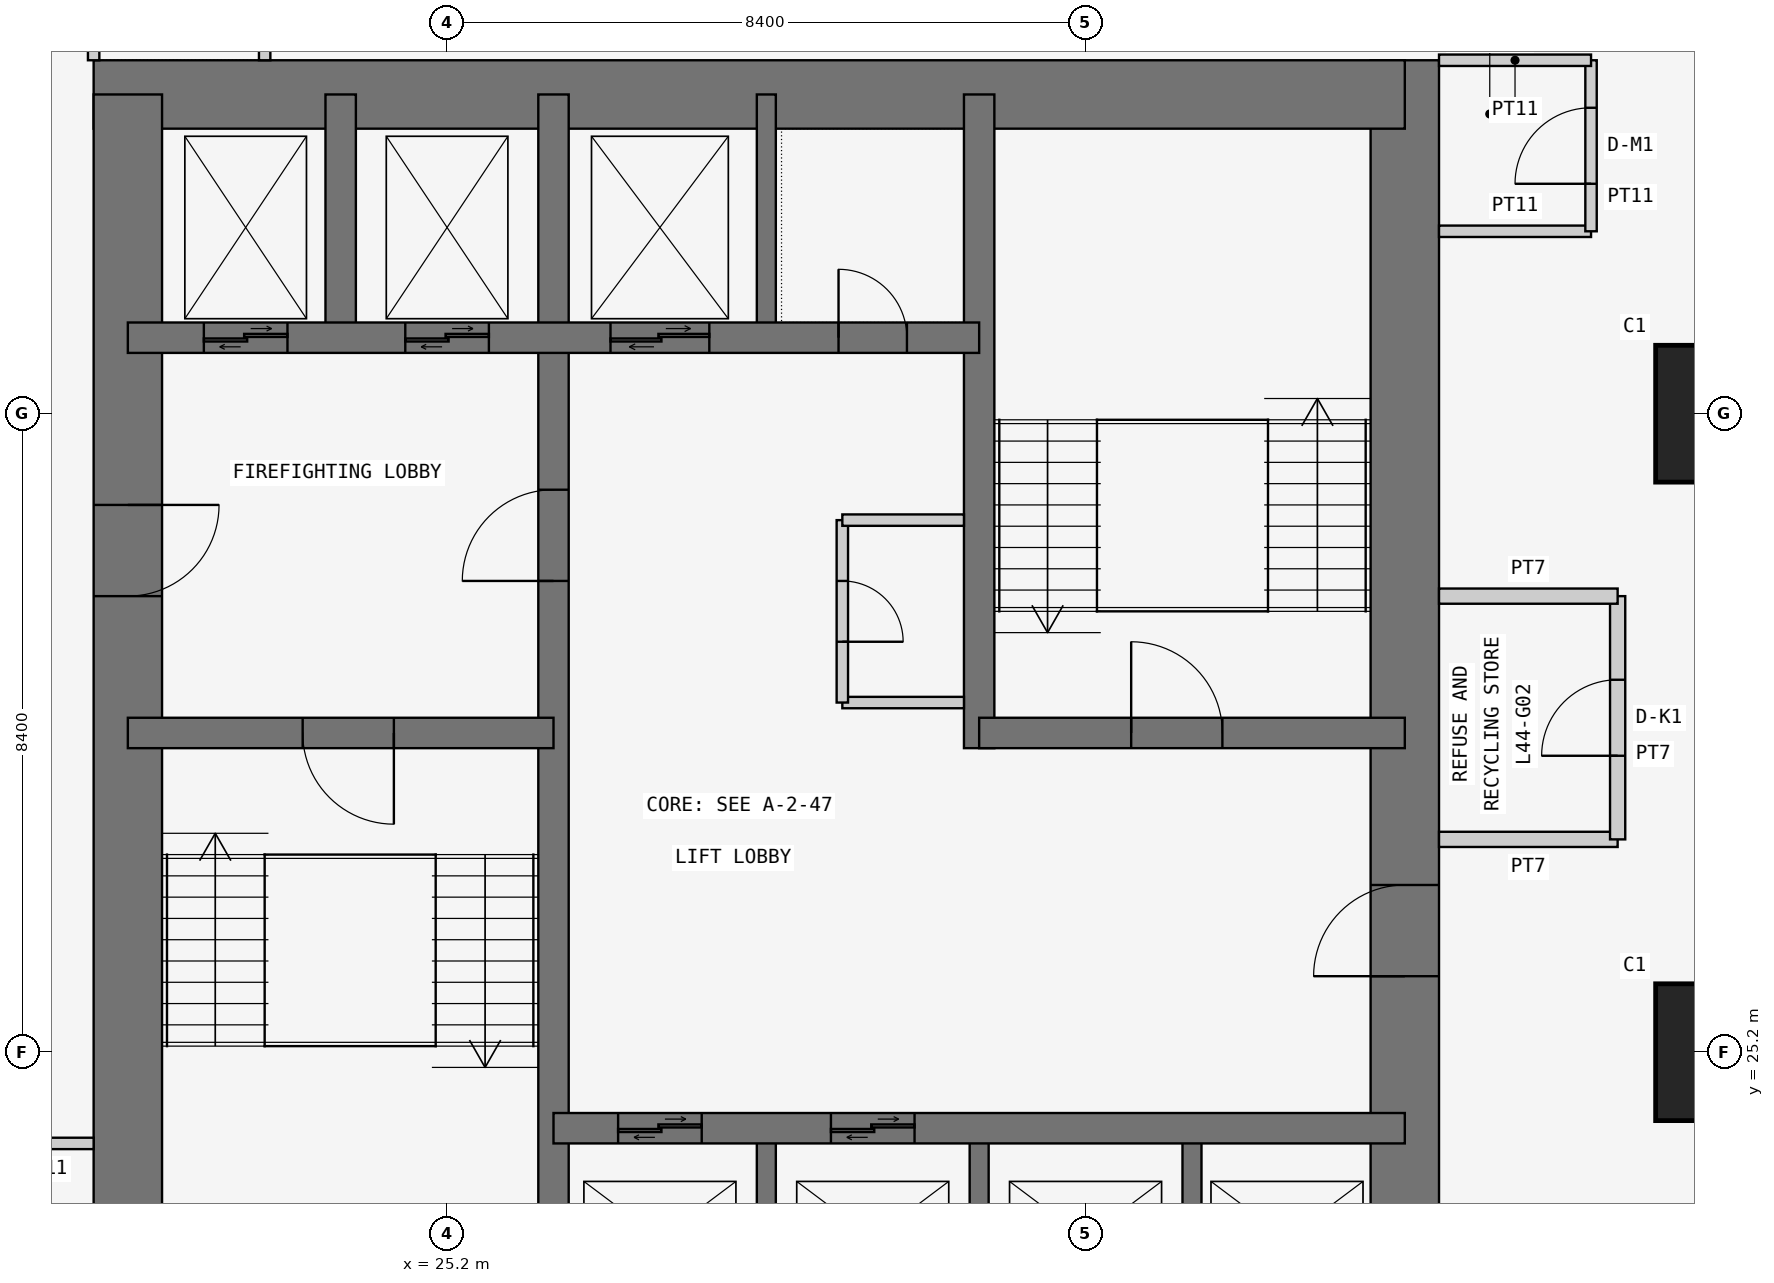
"""IFC4 building model, lengths in metres.
Left out: names, types, materials, properties, quantities, classifications, styles, units other than length and angle.
Written with IfcOpenShell. Run it as: python <this file> out.ifc"""

import sys

from ifc_helpers import new_model, si_unit, direction, frame, frame_2d, origin, origin_2d, place, context, subcontext, project, spatial, rectangle, extrude, element, fill, save


model = new_model("IFC4")
c1 = context("Model", 3, precision=1e-05, world=origin(), true_north=direction((0.0, 1.0)))
c2 = subcontext(c1, "Body", "Model", "MODEL_VIEW")
j1 = project(units=[si_unit("LENGTHUNIT", "METRE"), si_unit("PLANEANGLEUNIT", "RADIAN")], contexts=[c1])
p1 = place(None, origin())
s1 = spatial("IfcSite", under=j1, at=p1, CompositionType="ELEMENT")
p2 = place(p1, origin())
s2 = spatial("IfcBuilding", under=s1, at=p2, CompositionType="ELEMENT")
p3 = place(p2, frame((0.0, 0.0, 170.1)))
s3 = spatial("IfcBuildingStorey", under=s2, at=p3, CompositionType="ELEMENT", Elevation=170.1)
for number, where, z_axis, x_axis in (
    (1, (42.0, 25.2, 0.0), (0.0, 0.0, 1.0), (1.0, 0.0, 0.0)),
    (2, (42.0, 33.6, 0.0), (0.0, 0.0, 1.0), (1.0, 0.0, 0.0)),
):
    element("IfcColumn", number, at=place(p3, frame(where, z_axis=z_axis, x_axis=x_axis)), inside=s3, PredefinedType="COLUMN", context=c2, shape_type="SweptSolid", body=[
        extrude(rectangle(XDim=1.8, YDim=1.8, at=origin_2d()), origin(), (0.0, 0.0, 1.0), 3.6),
    ])
p4 = place(p3, frame((37.8, 21.0, 0.0), z_axis=(0.0, 0.0, 1.0), x_axis=(0.0, 1.0, 0.0)))
e3 = element("IfcWall", 3, at=p4, inside=s3, PredefinedType="SHEAR", context=c2, shape_type="SweptSolid", body=[
    extrude(rectangle(XDim=17.25, YDim=0.9, at=frame_2d((8.625, 0.0))), origin(), (0.0, 0.0, 1.0), 3.6),
])
p5 = place(p4, frame((5.2, 0.0, 0.0)))
e4 = element("IfcOpeningElement", 4, at=p5, cuts=e3, PredefinedType="OPENING", context=c2, shape_type="SweptSolid", body=[
    extrude(rectangle(XDim=1.2, YDim=2.1, at=frame_2d((0.6, 1.05))), frame((0.0, 0.46, 0.0), z_axis=(0.0, -1.0, 0.0), x_axis=(1.0, 0.0, 0.0)), (0.0, 0.0, 1.0), 0.92),
])
p6 = place(p3, frame((37.8, 37.8, 0.0), z_axis=(0.0, 0.0, 1.0), x_axis=(-1.0, 0.0, 0.0)))
e5 = element("IfcWall", 5, at=p6, inside=s3, PredefinedType="SHEAR", context=c2, shape_type="SweptSolid", body=[
    extrude(rectangle(XDim=17.25, YDim=0.9, at=frame_2d((8.625, 0.0))), origin(), (0.0, 0.0, 1.0), 3.6),
])
p7 = place(p3, frame((21.0, 37.8, 0.0), z_axis=(0.0, 0.0, 1.0), x_axis=(0.0, -1.0, 0.0)))
e6 = element("IfcWall", 6, at=p7, inside=s3, PredefinedType="SHEAR", context=c2, shape_type="SweptSolid", body=[
    extrude(rectangle(XDim=17.25, YDim=0.9, at=frame_2d((8.625, 0.0))), origin(), (0.0, 0.0, 1.0), 3.6),
])
p8 = place(p7, frame((5.4, 0.0, 0.0)))
e7 = element("IfcOpeningElement", 7, at=p8, cuts=e6, PredefinedType="OPENING", context=c2, shape_type="SweptSolid", body=[
    extrude(rectangle(XDim=1.2, YDim=2.1, at=frame_2d((0.6, 1.05))), frame((0.0, 0.46, 0.0), z_axis=(0.0, -1.0, 0.0), x_axis=(1.0, 0.0, 0.0)), (0.0, 0.0, 1.0), 0.92),
])
p9 = place(p3, frame((26.6, 21.0, 0.0), z_axis=(0.0, 0.0, 1.0), x_axis=(0.0, 1.0, 0.0)))
e8 = element("IfcWall", 8, at=p9, inside=s3, PredefinedType="SHEAR", context=c2, shape_type="SweptSolid", body=[
    extrude(rectangle(XDim=16.8, YDim=0.4, at=frame_2d((8.4, 0.0))), origin(), (0.0, 0.0, 1.0), 3.6),
])
p10 = place(p9, frame((10.4, 0.0, 0.0)))
e9 = element("IfcOpeningElement", 9, at=p10, cuts=e8, PredefinedType="OPENING", context=c2, shape_type="SweptSolid", body=[
    extrude(rectangle(XDim=1.2, YDim=2.1, at=frame_2d((0.6, 1.05))), frame((0.0, 0.21, 0.0), z_axis=(0.0, -1.0, 0.0), x_axis=(1.0, 0.0, 0.0)), (0.0, 0.0, 1.0), 0.42),
])
p11 = place(p3, frame((21.0, 29.4, 0.0), z_axis=(0.0, 0.0, 1.0), x_axis=(1.0, 0.0, 0.0)))
e10 = element("IfcWall", 10, at=p11, inside=s3, PredefinedType="SHEAR", context=c2, shape_type="SweptSolid", body=[
    extrude(rectangle(XDim=5.6, YDim=0.4, at=frame_2d((2.8, 0.0))), origin(), (0.0, 0.0, 1.0), 3.6),
])
p12 = place(p11, frame((2.3, 0.0, 0.0)))
e11 = element("IfcOpeningElement", 11, at=p12, cuts=e10, PredefinedType="OPENING", context=c2, shape_type="SweptSolid", body=[
    extrude(rectangle(XDim=1.2, YDim=2.1, at=frame_2d((0.6, 1.05))), frame((0.0, 0.21, 0.0), z_axis=(0.0, -1.0, 0.0), x_axis=(1.0, 0.0, 0.0)), (0.0, 0.0, 1.0), 0.42),
])
p13 = place(p3, frame((21.0, 34.6, 0.0), z_axis=(0.0, 0.0, 1.0), x_axis=(1.0, 0.0, 0.0)))
e12 = element("IfcWall", 12, at=p13, inside=s3, PredefinedType="SHEAR", context=c2, shape_type="SweptSolid", body=[
    extrude(rectangle(XDim=11.2, YDim=0.4, at=frame_2d((5.6, 0.0))), origin(), (0.0, 0.0, 1.0), 3.6),
])
p14 = place(p13, frame((9.35, 0.0, 0.0)))
e13 = element("IfcOpeningElement", 13, at=p14, cuts=e12, PredefinedType="OPENING", context=c2, shape_type="SweptSolid", body=[
    extrude(rectangle(XDim=0.9, YDim=2.1, at=frame_2d((0.45, 1.05))), frame((0.0, 0.21, 0.0), z_axis=(0.0, -1.0, 0.0), x_axis=(1.0, 0.0, 0.0)), (0.0, 0.0, 1.0), 0.42),
])
p15 = place(p13, frame((1.0, 0.0, 0.0)))
e14 = element("IfcOpeningElement", 14, at=p15, cuts=e12, PredefinedType="OPENING", context=c2, shape_type="SweptSolid", body=[
    extrude(rectangle(XDim=1.1, YDim=2.1, at=frame_2d((0.55, 1.05))), frame((0.0, 0.21, 0.0), z_axis=(0.0, -1.0, 0.0), x_axis=(1.0, 0.0, 0.0)), (0.0, 0.0, 1.0), 0.42),
])
p16 = place(p13, frame((3.65, 0.0, 0.0)))
e15 = element("IfcOpeningElement", 15, at=p16, cuts=e12, PredefinedType="OPENING", context=c2, shape_type="SweptSolid", body=[
    extrude(rectangle(XDim=1.1, YDim=2.1, at=frame_2d((0.55, 1.05))), frame((0.0, 0.21, 0.0), z_axis=(0.0, -1.0, 0.0), x_axis=(1.0, 0.0, 0.0)), (0.0, 0.0, 1.0), 0.42),
])
p17 = place(p13, frame((6.35, 0.0, 0.0)))
e16 = element("IfcOpeningElement", 16, at=p17, cuts=e12, PredefinedType="OPENING", context=c2, shape_type="SweptSolid", body=[
    extrude(rectangle(XDim=1.3, YDim=2.1, at=frame_2d((0.65, 1.05))), frame((0.0, 0.21, 0.0), z_axis=(0.0, -1.0, 0.0), x_axis=(1.0, 0.0, 0.0)), (0.0, 0.0, 1.0), 0.42),
])
p18 = place(p3, frame((23.8, 34.6, 0.0), z_axis=(0.0, 0.0, 1.0), x_axis=(0.0, 1.0, 0.0)))
e17 = element("IfcWall", 17, at=p18, inside=s3, PredefinedType="SHEAR", context=c2, shape_type="SweptSolid", body=[
    extrude(rectangle(XDim=3.2, YDim=0.4, at=frame_2d((1.6, 0.0))), origin(), (0.0, 0.0, 1.0), 3.6),
])
p19 = place(p3, frame((26.6, 24.2, 0.0), z_axis=(0.0, 0.0, 1.0), x_axis=(1.0, 0.0, 0.0)))
e18 = element("IfcWall", 18, at=p19, inside=s3, PredefinedType="SHEAR", context=c2, shape_type="SweptSolid", body=[
    extrude(rectangle(XDim=11.2, YDim=0.4, at=frame_2d((5.6, 0.0))), origin(), (0.0, 0.0, 1.0), 3.6),
])
p20 = place(p19, frame((0.85, 0.0, 0.0)))
e19 = element("IfcOpeningElement", 19, at=p20, cuts=e18, PredefinedType="OPENING", context=c2, shape_type="SweptSolid", body=[
    extrude(rectangle(XDim=1.1, YDim=2.1, at=frame_2d((0.55, 1.05))), frame((0.0, 0.21, 0.0), z_axis=(0.0, -1.0, 0.0), x_axis=(1.0, 0.0, 0.0)), (0.0, 0.0, 1.0), 0.42),
])
p21 = place(p19, frame((3.65, 0.0, 0.0)))
e20 = element("IfcOpeningElement", 20, at=p21, cuts=e18, PredefinedType="OPENING", context=c2, shape_type="SweptSolid", body=[
    extrude(rectangle(XDim=1.1, YDim=2.1, at=frame_2d((0.55, 1.05))), frame((0.0, 0.21, 0.0), z_axis=(0.0, -1.0, 0.0), x_axis=(1.0, 0.0, 0.0)), (0.0, 0.0, 1.0), 0.42),
])
p22 = place(p3, frame((32.2, 29.2, 0.0), z_axis=(0.0, 0.0, 1.0), x_axis=(0.0, 1.0, 0.0)))
e21 = element("IfcWall", 21, at=p22, inside=s3, PredefinedType="SHEAR", context=c2, shape_type="SweptSolid", body=[
    extrude(rectangle(XDim=8.6, YDim=0.4, at=frame_2d((4.3, 0.0))), origin(), (0.0, 0.0, 1.0), 3.6),
])
p23 = place(p3, frame((32.2, 29.4, 0.0), z_axis=(0.0, 0.0, 1.0), x_axis=(1.0, 0.0, 0.0)))
e22 = element("IfcWall", 22, at=p23, inside=s3, PredefinedType="SHEAR", context=c2, shape_type="SweptSolid", body=[
    extrude(rectangle(XDim=5.6, YDim=0.4, at=frame_2d((2.8, 0.0))), origin(), (0.0, 0.0, 1.0), 3.6),
])
p24 = place(p23, frame((2.0, 0.0, 0.0)))
e23 = element("IfcOpeningElement", 23, at=p24, cuts=e22, PredefinedType="OPENING", context=c2, shape_type="SweptSolid", body=[
    extrude(rectangle(XDim=1.2, YDim=2.1, at=frame_2d((0.6, 1.05))), frame((0.0, 0.21, 0.0), z_axis=(0.0, -1.0, 0.0), x_axis=(1.0, 0.0, 0.0)), (0.0, 0.0, 1.0), 0.42),
])
for number, where, z_axis, x_axis in (
    (24, (29.4, 21.0, 0.0), (0.0, 0.0, 1.0), (0.0, 1.0, 0.0)),
    (25, (32.2, 21.0, 0.0), (0.0, 0.0, 1.0), (0.0, 1.0, 0.0)),
    (26, (35.0, 21.0, 0.0), (0.0, 0.0, 1.0), (0.0, 1.0, 0.0)),
    (27, (29.4, 34.6, 0.0), (0.0, 0.0, 1.0), (0.0, 1.0, 0.0)),
):
    element("IfcWall", number, at=place(p3, frame(where, z_axis=z_axis, x_axis=x_axis)), inside=s3, PredefinedType="SHEAR", context=c2, shape_type="SweptSolid", body=[
        extrude(rectangle(XDim=3.2, YDim=0.25, at=frame_2d((1.6, 0.0))), origin(), (0.0, 0.0, 1.0), 3.6),
    ])
for number, where, z_axis, x_axis in (
    (28, (22.8, 38.25, 0.0), (0.0, 0.0, 1.0), (0.0, 1.0, 0.0)),
    (29, (20.55, 40.25, 0.0), (0.0, 0.0, 1.0), (0.0, -1.0, 0.0)),
):
    element("IfcWall", number, at=place(p3, frame(where, z_axis=z_axis, x_axis=x_axis)), inside=s3, PredefinedType="PARTITIONING", context=c2, shape_type="SweptSolid", body=[
        extrude(rectangle(XDim=2.0, YDim=0.15, at=frame_2d((1.0, 0.0))), origin(), (0.0, 0.0, 1.0), 3.45),
    ])
p25 = place(p3, frame((38.25, 28.0, 0.0), z_axis=(0.0, 0.0, 1.0), x_axis=(1.0, 0.0, 0.0)))
e30 = element("IfcWall", 30, at=p25, inside=s3, PredefinedType="PARTITIONING", context=c2, shape_type="SweptSolid", body=[
    extrude(rectangle(XDim=2.35, YDim=0.2, at=frame_2d((1.175, 0.0))), origin(), (0.0, 0.0, 1.0), 3.45),
])
p26 = place(p3, frame((40.6, 28.0, 0.0), z_axis=(0.0, 0.0, 1.0), x_axis=(0.0, 1.0, 0.0)))
e31 = element("IfcWall", 31, at=p26, inside=s3, PredefinedType="PARTITIONING", context=c2, shape_type="SweptSolid", body=[
    extrude(rectangle(XDim=3.2, YDim=0.2, at=frame_2d((1.6, 0.0))), origin(), (0.0, 0.0, 1.0), 3.45),
])
p27 = place(p26, frame((1.1, 0.0, 0.0)))
e32 = element("IfcOpeningElement", 32, at=p27, cuts=e31, PredefinedType="OPENING", context=c2, shape_type="SweptSolid", body=[
    extrude(rectangle(XDim=1.0, YDim=2.1, at=frame_2d((0.5, 1.05))), frame((0.0, 0.11, 0.0), z_axis=(0.0, -1.0, 0.0), x_axis=(1.0, 0.0, 0.0)), (0.0, 0.0, 1.0), 0.22),
])
p28 = place(p3, frame((40.6, 31.2, 0.0), z_axis=(0.0, 0.0, 1.0), x_axis=(-1.0, 0.0, 0.0)))
e33 = element("IfcWall", 33, at=p28, inside=s3, PredefinedType="PARTITIONING", context=c2, shape_type="SweptSolid", body=[
    extrude(rectangle(XDim=2.35, YDim=0.2, at=frame_2d((1.175, 0.0))), origin(), (0.0, 0.0, 1.0), 3.45),
])
p29 = place(p3, frame((38.25, 36.0, 0.0), z_axis=(0.0, 0.0, 1.0), x_axis=(1.0, 0.0, 0.0)))
e34 = element("IfcWall", 34, at=p29, inside=s3, PredefinedType="PARTITIONING", context=c2, shape_type="SweptSolid", body=[
    extrude(rectangle(XDim=2.0, YDim=0.15, at=frame_2d((1.0, 0.0))), origin(), (0.0, 0.0, 1.0), 3.45),
])
p30 = place(p3, frame((40.25, 36.0, 0.0), z_axis=(0.0, 0.0, 1.0), x_axis=(0.0, 1.0, 0.0)))
e35 = element("IfcWall", 35, at=p30, inside=s3, PredefinedType="PARTITIONING", context=c2, shape_type="SweptSolid", body=[
    extrude(rectangle(XDim=2.25, YDim=0.15, at=frame_2d((1.125, 0.0))), origin(), (0.0, 0.0, 1.0), 3.45),
])
p31 = place(p30, frame((0.625, 0.0, 0.0)))
e36 = element("IfcOpeningElement", 36, at=p31, cuts=e35, PredefinedType="OPENING", context=c2, shape_type="SweptSolid", body=[
    extrude(rectangle(XDim=1.0, YDim=2.1, at=frame_2d((0.5, 1.05))), frame((0.0, 0.085, 0.0), z_axis=(0.0, -1.0, 0.0), x_axis=(1.0, 0.0, 0.0)), (0.0, 0.0, 1.0), 0.17),
])
p32 = place(p3, frame((40.25, 38.25, 0.0), z_axis=(0.0, 0.0, 1.0), x_axis=(-1.0, 0.0, 0.0)))
e37 = element("IfcWall", 37, at=p32, inside=s3, PredefinedType="PARTITIONING", context=c2, shape_type="SweptSolid", body=[
    extrude(rectangle(XDim=2.0, YDim=0.15, at=frame_2d((1.0, 0.0))), origin(), (0.0, 0.0, 1.0), 3.45),
])
p33 = place(p3, frame((20.55, 24.0, 0.0), z_axis=(0.0, 0.0, 1.0), x_axis=(-1.0, 0.0, 0.0)))
e38 = element("IfcWall", 38, at=p33, inside=s3, PredefinedType="PARTITIONING", context=c2, shape_type="SweptSolid", body=[
    extrude(rectangle(XDim=1.3, YDim=0.15, at=frame_2d((0.65, 0.0))), origin(), (0.0, 0.0, 1.0), 3.45),
])
p34 = place(p3, frame((32.0, 29.8, 0.0), z_axis=(0.0, 0.0, 1.0), x_axis=(-1.0, 0.0, 0.0)))
e39 = element("IfcWall", 39, at=p34, inside=s3, PredefinedType="PARTITIONING", context=c2, shape_type="SweptSolid", body=[
    extrude(rectangle(XDim=1.6, YDim=0.15, at=frame_2d((0.8, 0.0))), origin(), (0.0, 0.0, 1.0), 3.45),
])
p35 = place(p3, frame((30.4, 29.8, 0.0), z_axis=(0.0, 0.0, 1.0), x_axis=(0.0, 1.0, 0.0)))
e40 = element("IfcWall", 40, at=p35, inside=s3, PredefinedType="PARTITIONING", context=c2, shape_type="SweptSolid", body=[
    extrude(rectangle(XDim=2.4, YDim=0.15, at=frame_2d((1.2, 0.0))), origin(), (0.0, 0.0, 1.0), 3.45),
])
p36 = place(p35, frame((0.8, 0.0, 0.0)))
e41 = element("IfcOpeningElement", 41, at=p36, cuts=e40, PredefinedType="OPENING", context=c2, shape_type="SweptSolid", body=[
    extrude(rectangle(XDim=0.8, YDim=2.1, at=frame_2d((0.4, 1.05))), frame((0.0, 0.085, 0.0), z_axis=(0.0, -1.0, 0.0), x_axis=(1.0, 0.0, 0.0)), (0.0, 0.0, 1.0), 0.17),
])
p37 = place(p3, frame((30.4, 32.2, 0.0), z_axis=(0.0, 0.0, 1.0), x_axis=(1.0, 0.0, 0.0)))
e42 = element("IfcWall", 42, at=p37, inside=s3, PredefinedType="PARTITIONING", context=c2, shape_type="SweptSolid", body=[
    extrude(rectangle(XDim=1.6, YDim=0.15, at=frame_2d((0.8, 0.0))), origin(), (0.0, 0.0, 1.0), 3.45),
])
p38 = place(p27, origin())
e43 = element("IfcDoor", 43, at=p38, inside=s3, OperationType="SINGLE_SWING_LEFT", PredefinedType="DOOR", context=c2, shape_type="SweptSolid", body=[
    extrude(rectangle(XDim=1.0, YDim=2.1, at=frame_2d((0.5, 1.05))), frame((0.0, 0.025, 0.0), z_axis=(0.0, -1.0, 0.0), x_axis=(1.0, 0.0, 0.0)), (0.0, 0.0, 1.0), 0.05),
])
fill(e32, e43)
p39 = place(p31, origin())
e44 = element("IfcDoor", 44, at=p39, inside=s3, OperationType="SINGLE_SWING_LEFT", PredefinedType="DOOR", context=c2, shape_type="SweptSolid", body=[
    extrude(rectangle(XDim=1.0, YDim=2.1, at=frame_2d((0.5, 1.05))), frame((0.0, 0.025, 0.0), z_axis=(0.0, -1.0, 0.0), x_axis=(1.0, 0.0, 0.0)), (0.0, 0.0, 1.0), 0.05),
])
fill(e36, e44)
p40 = place(p8, origin())
e45 = element("IfcDoor", 45, at=p40, inside=s3, OperationType="SINGLE_SWING_LEFT", PredefinedType="DOOR", context=c2, shape_type="SweptSolid", body=[
    extrude(rectangle(XDim=1.2, YDim=2.1, at=frame_2d((0.6, 1.05))), frame((0.0, 0.025, 0.0), z_axis=(0.0, -1.0, 0.0), x_axis=(1.0, 0.0, 0.0)), (0.0, 0.0, 1.0), 0.05),
])
fill(e7, e45)
p41 = place(p12, frame((1.2, 0.0, 0.0), z_axis=(0.0, 0.0, 1.0), x_axis=(-1.0, 0.0, 0.0)))
e46 = element("IfcDoor", 46, at=p41, inside=s3, OperationType="SINGLE_SWING_LEFT", PredefinedType="DOOR", context=c2, shape_type="SweptSolid", body=[
    extrude(rectangle(XDim=1.2, YDim=2.1, at=frame_2d((0.6, 1.05))), frame((0.0, 0.025, 0.0), z_axis=(0.0, -1.0, 0.0), x_axis=(1.0, 0.0, 0.0)), (0.0, 0.0, 1.0), 0.05),
])
fill(e11, e46)
p42 = place(p10, origin())
e47 = element("IfcDoor", 47, at=p42, inside=s3, OperationType="SINGLE_SWING_LEFT", PredefinedType="DOOR", context=c2, shape_type="SweptSolid", body=[
    extrude(rectangle(XDim=1.2, YDim=2.1, at=frame_2d((0.6, 1.05))), frame((0.0, 0.025, 0.0), z_axis=(0.0, -1.0, 0.0), x_axis=(1.0, 0.0, 0.0)), (0.0, 0.0, 1.0), 0.05),
])
fill(e9, e47)
p43 = place(p5, origin())
e48 = element("IfcDoor", 48, at=p43, inside=s3, OperationType="SINGLE_SWING_LEFT", PredefinedType="DOOR", context=c2, shape_type="SweptSolid", body=[
    extrude(rectangle(XDim=1.2, YDim=2.1, at=frame_2d((0.6, 1.05))), frame((0.0, 0.025, 0.0), z_axis=(0.0, -1.0, 0.0), x_axis=(1.0, 0.0, 0.0)), (0.0, 0.0, 1.0), 0.05),
])
fill(e4, e48)
p44 = place(p24, origin())
e49 = element("IfcDoor", 49, at=p44, inside=s3, OperationType="SINGLE_SWING_LEFT", PredefinedType="DOOR", context=c2, shape_type="SweptSolid", body=[
    extrude(rectangle(XDim=1.2, YDim=2.1, at=frame_2d((0.6, 1.05))), frame((0.0, 0.025, 0.0), z_axis=(0.0, -1.0, 0.0), x_axis=(1.0, 0.0, 0.0)), (0.0, 0.0, 1.0), 0.05),
])
fill(e23, e49)
p45 = place(p14, origin())
e50 = element("IfcDoor", 50, at=p45, inside=s3, OperationType="SINGLE_SWING_LEFT", PredefinedType="DOOR", context=c2, shape_type="SweptSolid", body=[
    extrude(rectangle(XDim=0.9, YDim=2.1, at=frame_2d((0.45, 1.05))), frame((0.0, 0.025, 0.0), z_axis=(0.0, -1.0, 0.0), x_axis=(1.0, 0.0, 0.0)), (0.0, 0.0, 1.0), 0.05),
])
fill(e13, e50)
p46 = place(p36, frame((0.8, 0.0, 0.0), z_axis=(0.0, 0.0, 1.0), x_axis=(-1.0, 0.0, 0.0)))
e51 = element("IfcDoor", 51, at=p46, inside=s3, OperationType="SINGLE_SWING_RIGHT", PredefinedType="DOOR", context=c2, shape_type="SweptSolid", body=[
    extrude(rectangle(XDim=0.8, YDim=2.1, at=frame_2d((0.4, 1.05))), frame((0.0, 0.025, 0.0), z_axis=(0.0, -1.0, 0.0), x_axis=(1.0, 0.0, 0.0)), (0.0, 0.0, 1.0), 0.05),
])
fill(e41, e51)
p47 = place(p20, origin())
e52 = element("IfcDoor", 52, at=p47, inside=s3, OperationType="DOUBLE_DOOR_SLIDING", PredefinedType="DOOR", context=c2, shape_type="SweptSolid", body=[
    extrude(rectangle(XDim=1.1, YDim=2.1, at=frame_2d((0.55, 1.05))), frame((0.0, 0.025, 0.0), z_axis=(0.0, -1.0, 0.0), x_axis=(1.0, 0.0, 0.0)), (0.0, 0.0, 1.0), 0.05),
])
fill(e19, e52)
p48 = place(p21, origin())
e53 = element("IfcDoor", 53, at=p48, inside=s3, OperationType="DOUBLE_DOOR_SLIDING", PredefinedType="DOOR", context=c2, shape_type="SweptSolid", body=[
    extrude(rectangle(XDim=1.1, YDim=2.1, at=frame_2d((0.55, 1.05))), frame((0.0, 0.025, 0.0), z_axis=(0.0, -1.0, 0.0), x_axis=(1.0, 0.0, 0.0)), (0.0, 0.0, 1.0), 0.05),
])
fill(e20, e53)
p49 = place(p15, origin())
e54 = element("IfcDoor", 54, at=p49, inside=s3, OperationType="DOUBLE_DOOR_SLIDING", PredefinedType="DOOR", context=c2, shape_type="SweptSolid", body=[
    extrude(rectangle(XDim=1.1, YDim=2.1, at=frame_2d((0.55, 1.05))), frame((0.0, 0.025, 0.0), z_axis=(0.0, -1.0, 0.0), x_axis=(1.0, 0.0, 0.0)), (0.0, 0.0, 1.0), 0.05),
])
fill(e14, e54)
p50 = place(p16, origin())
e55 = element("IfcDoor", 55, at=p50, inside=s3, OperationType="DOUBLE_DOOR_SLIDING", PredefinedType="DOOR", context=c2, shape_type="SweptSolid", body=[
    extrude(rectangle(XDim=1.1, YDim=2.1, at=frame_2d((0.55, 1.05))), frame((0.0, 0.025, 0.0), z_axis=(0.0, -1.0, 0.0), x_axis=(1.0, 0.0, 0.0)), (0.0, 0.0, 1.0), 0.05),
])
fill(e15, e55)
p51 = place(p17, origin())
e56 = element("IfcDoor", 56, at=p51, inside=s3, OperationType="DOUBLE_DOOR_SLIDING", PredefinedType="DOOR", context=c2, shape_type="SweptSolid", body=[
    extrude(rectangle(XDim=1.3, YDim=2.1, at=frame_2d((0.65, 1.05))), frame((0.0, 0.025, 0.0), z_axis=(0.0, -1.0, 0.0), x_axis=(1.0, 0.0, 0.0)), (0.0, 0.0, 1.0), 0.05),
])
fill(e16, e56)
save(model, sys.argv[1])
